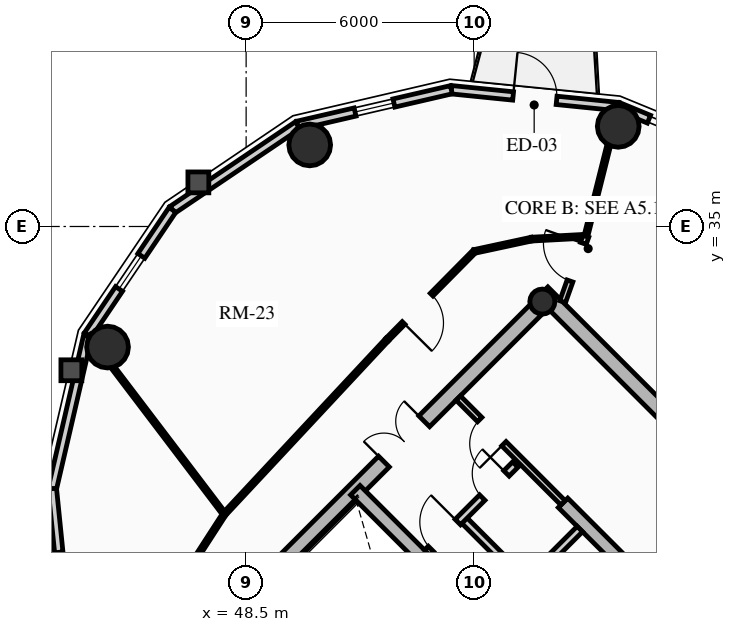
"""IFC4 building model, lengths in metres.
Left out: names, types, materials, properties, quantities, classifications, styles, units other than length and angle.
Written with IfcOpenShell. Run it as: python <this file> out.ifc"""

import sys

from ifc_helpers import new_model, si_unit, direction, frame, frame_2d, origin, origin_2d, place, context, subcontext, project, spatial, rectangle, circle, hollow_circle, extrude, source, transform, mapped, element, fill, save


model = new_model("IFC4")
c1 = context("Model", 3, precision=1e-05, world=origin(), true_north=direction((0.0, 1.0)))
c2 = subcontext(c1, "Body", "Model", "MODEL_VIEW")
j1 = project(units=[si_unit("LENGTHUNIT", "METRE"), si_unit("PLANEANGLEUNIT", "RADIAN")], contexts=[c1])
p1 = place(None, origin())
s1 = spatial("IfcSite", under=j1, at=p1, CompositionType="ELEMENT")
p2 = place(p1, origin())
s2 = spatial("IfcBuilding", under=s1, at=p2, CompositionType="ELEMENT")
p3 = place(p2, frame((0.0, 0.0, 199.57)))
s3 = spatial("IfcBuildingStorey", under=s2, at=p3, CompositionType="ELEMENT", Elevation=199.57)
p4 = place(p3, frame((66.268, 23.298, 0.0), z_axis=(0.0, 0.0, 1.0), x_axis=(-0.707106781187, 0.707106781187, 0.0)))
e1 = element("IfcWall", 1, at=p4, inside=s3, PredefinedType="SHEAR", context=c2, shape_type="SweptSolid", body=[
    extrude(rectangle(XDim=14.1, YDim=0.4, at=frame_2d((7.05, 0.0))), origin(), (0.0, 0.0, 1.0), 2.91),
])
p5 = place(p3, frame((48.873, 25.561, 0.0), z_axis=(0.0, 0.0, 1.0), x_axis=(0.707106781187, 0.707106781187, 0.0)))
e2 = element("IfcWall", 2, at=p5, inside=s3, PredefinedType="SHEAR", context=c2, shape_type="SweptSolid", body=[
    extrude(rectangle(XDim=10.7, YDim=0.4, at=frame_2d((5.35, 0.0))), origin(), (0.0, 0.0, 1.0), 2.91),
])
m1 = source(origin(), c2, "Body", "SweptSolid", [
    extrude(rectangle(XDim=1.5, YDim=2.02, at=frame_2d((0.75, 1.01))), frame((0.0, 0.21, 0.0), z_axis=(0.0, -1.0, 0.0), x_axis=(1.0, 0.0, 0.0)), (0.0, 0.0, 1.0), 0.42),
])
p6 = place(p5, frame((4.6, 0.0, 0.0)))
e3 = element("IfcOpeningElement", 3, at=p6, cuts=e2, PredefinedType="OPENING", context=c2, shape_type="MappedRepresentation", body=[
    mapped(m1, transform((0.0, 0.0, 0.0), x_axis=(1.0, 0.0, 0.0), y_axis=(0.0, 1.0, 0.0), z_axis=(0.0, 0.0, 1.0), scale=1.0)),
])
p7 = place(p3, frame((61.06, 18.373, 0.0), z_axis=(0.0, 0.0, 1.0), x_axis=(-0.707106781187, 0.707106781187, 0.0)))
e4 = element("IfcWall", 4, at=p7, inside=s3, PredefinedType="SHEAR", context=c2, shape_type="SweptSolid", body=[
    extrude(rectangle(XDim=13.7, YDim=0.35, at=frame_2d((6.85, 0.0))), origin(), (0.0, 0.0, 1.0), 2.91),
])
m2 = source(origin(), c2, "Body", "SweptSolid", [
    extrude(rectangle(XDim=1.1, YDim=2.015, at=frame_2d((0.55, 1.007))), frame((0.0, 0.185, 0.0), z_axis=(0.0, -1.0, 0.0), x_axis=(1.0, 0.0, 0.0)), (0.0, 0.0, 1.0), 0.37),
])
p8 = place(p7, frame((4.85, 0.0, 0.0)))
e5 = element("IfcOpeningElement", 5, at=p8, cuts=e4, PredefinedType="OPENING", context=c2, shape_type="MappedRepresentation", body=[
    mapped(m2, transform((0.0, 0.0, 0.0), x_axis=(1.0, 0.0, 0.0), y_axis=(0.0, 1.0, 0.0), z_axis=(0.0, 0.0, 1.0), scale=1.0)),
])
p9 = place(p7, frame((0.625, 0.0, 0.0)))
e6 = element("IfcOpeningElement", 6, at=p9, cuts=e4, PredefinedType="OPENING", context=c2, shape_type="MappedRepresentation", body=[
    mapped(m2, transform((0.0, 0.0, 0.0), x_axis=(1.0, 0.0, 0.0), y_axis=(0.0, 1.0, 0.0), z_axis=(0.0, 0.0, 1.0), scale=1.0)),
])
p10 = place(p7, frame((2.625, 0.0, 0.0)))
e7 = element("IfcOpeningElement", 7, at=p10, cuts=e4, PredefinedType="OPENING", context=c2, shape_type="MappedRepresentation", body=[
    mapped(m2, transform((0.0, 0.0, 0.0), x_axis=(1.0, 0.0, 0.0), y_axis=(0.0, 1.0, 0.0), z_axis=(0.0, 0.0, 1.0), scale=1.0)),
])
m3 = source(origin(), c2, "Body", "SweptSolid", [
    extrude(rectangle(XDim=1.15, YDim=2.02, at=frame_2d((0.575, 1.01))), frame((0.0, 0.185, 0.0), z_axis=(0.0, -1.0, 0.0), x_axis=(1.0, 0.0, 0.0)), (0.0, 0.0, 1.0), 0.37),
])
p11 = place(p7, frame((7.27, 0.0, 0.0)))
e8 = element("IfcOpeningElement", 8, at=p11, cuts=e4, PredefinedType="OPENING", context=c2, shape_type="MappedRepresentation", body=[
    mapped(m3, transform((0.0, 0.0, 0.0), x_axis=(1.0, 0.0, 0.0), y_axis=(0.0, 1.0, 0.0), z_axis=(0.0, 0.0, 1.0), scale=1.0)),
])
p12 = place(p3, frame((63.627, 20.94, 0.0), z_axis=(0.0, 0.0, 1.0), x_axis=(-0.707119496762, 0.707094065383, 0.0)))
e9 = element("IfcWall", 9, at=p12, inside=s3, PredefinedType="SHEAR", context=c2, shape_type="SweptSolid", body=[
    extrude(rectangle(XDim=9.6, YDim=0.35, at=frame_2d((4.8, 0.0))), origin(), (0.0, 0.0, 1.0), 2.91),
])
p13 = place(p12, frame((5.28, 0.0, 0.0)))
e10 = element("IfcOpeningElement", 10, at=p13, cuts=e9, PredefinedType="OPENING", context=c2, shape_type="MappedRepresentation", body=[
    mapped(m3, transform((0.0, 0.0, 0.0), x_axis=(1.0, 0.0, 0.0), y_axis=(0.0, 1.0, 0.0), z_axis=(0.0, 0.0, 1.0), scale=1.0)),
])
p14 = place(p3, frame((58.893, 25.674, 0.0), z_axis=(0.0, 0.0, 1.0), x_axis=(0.707106781187, 0.707106781187, 0.0)))
e11 = element("IfcWall", 11, at=p14, inside=s3, PredefinedType="SHEAR", context=c2, shape_type="SweptSolid", body=[
    extrude(rectangle(XDim=3.285, YDim=0.35, at=frame_2d((1.643, 0.0))), origin(), (0.0, 0.0, 1.0), 2.91),
])
p15 = place(p3, frame((56.294, 33.024, 0.0), z_axis=(0.0, 0.0, 1.0), x_axis=(0.707106781187, 0.707106781187, 0.0)))
e12 = element("IfcColumn", 12, at=p15, inside=s3, PredefinedType="COLUMN", context=c2, shape_type="SweptSolid", body=[
    extrude(hollow_circle(Radius=0.33, WallThickness=0.025, at=origin_2d()), origin(), (0.0, 0.0, 1.0), 2.91),
])
for number, where, z_axis, x_axis in (
    (13, (58.291, 37.635, 0.0), (0.0, 0.0, 1.0), (1.0, 0.0, 0.0)),
    (14, (50.173, 37.146, 0.0), (0.0, 0.0, 1.0), (1.0, 0.0, 0.0)),
    (15, (44.854, 31.827, 0.0), (0.0, 0.0, 1.0), (1.0, 0.0, 0.0)),
):
    element("IfcColumn", number, at=place(p3, frame(where, z_axis=z_axis, x_axis=x_axis)), inside=s3, PredefinedType="USERDEFINED", context=c2, shape_type="SweptSolid", body=[
        extrude(circle(Radius=0.55, at=origin_2d()), origin(), (0.0, 0.0, 1.0), 2.91),
    ])
p16 = place(p3, frame((58.295, 38.155, 0.0), z_axis=(0.0, 0.0, 1.0), x_axis=(0.924515260676, -0.381145028536, 0.0)))
e16 = element("IfcWall", 16, at=p16, inside=s3, PredefinedType="SOLIDWALL", context=c2, shape_type="SweptSolid", body=[
    extrude(rectangle(XDim=0.87, YDim=0.22, at=frame_2d((0.435, 0.0))), origin(), (0.0, 0.0, 1.0), 2.322),
])
p17 = place(p3, frame((53.9, 38.599, 0.0), z_axis=(0.0, 0.0, 1.0), x_axis=(0.994929930991, -0.100570534541, 0.0)))
e17 = element("IfcWall", 17, at=p17, inside=s3, PredefinedType="SOLIDWALL", context=c2, shape_type="SweptSolid", body=[
    extrude(rectangle(XDim=4.418, YDim=0.22, at=frame_2d((2.209, 0.0))), origin(), (0.0, 0.0, 1.0), 2.322),
])
m4 = source(origin(), c2, "Body", "SweptSolid", [
    extrude(rectangle(XDim=1.15, YDim=2.005, at=frame_2d((0.575, 1.002))), frame((0.0, 0.12, 0.0), z_axis=(0.0, -1.0, 0.0), x_axis=(1.0, 0.0, 0.0)), (0.0, 0.0, 1.0), 0.24),
])
p18 = place(p17, frame((1.634, 0.0, 0.0)))
e18 = element("IfcOpeningElement", 18, at=p18, cuts=e17, PredefinedType="OPENING", context=c2, shape_type="MappedRepresentation", body=[
    mapped(m4, transform((0.0, 0.0, 0.0), x_axis=(1.0, 0.0, 0.0), y_axis=(0.0, 1.0, 0.0), z_axis=(0.0, 0.0, 1.0), scale=1.0)),
])
p19 = place(p3, frame((49.856, 37.663, 0.0), z_axis=(0.0, 0.0, 1.0), x_axis=(0.974249228678, 0.225473813158, 0.0)))
e19 = element("IfcWall", 19, at=p19, inside=s3, PredefinedType="SOLIDWALL", context=c2, shape_type="SweptSolid", body=[
    extrude(rectangle(XDim=4.15, YDim=0.22, at=frame_2d((2.075, 0.0))), origin(), (0.0, 0.0, 1.0), 2.322),
])
m5 = source(origin(), c2, "Body", "SweptSolid", [
    extrude(rectangle(XDim=1.05, YDim=1.3, at=frame_2d((0.525, 0.65))), frame((0.0, 0.12, 0.0), z_axis=(0.0, -1.0, 0.0), x_axis=(1.0, 0.0, 0.0)), (0.0, 0.0, 1.0), 0.24),
])
p20 = place(p19, frame((1.55, 0.0, 0.65)))
e20 = element("IfcOpeningElement", 20, at=p20, cuts=e19, PredefinedType="OPENING", context=c2, shape_type="MappedRepresentation", body=[
    mapped(m5, transform((0.0, 0.0, 0.0), x_axis=(1.0, 0.0, 0.0), y_axis=(0.0, 1.0, 0.0), z_axis=(0.0, 0.0, 1.0), scale=1.0)),
])
p21 = place(p3, frame((46.561, 35.439, 0.0), z_axis=(0.0, 0.0, 1.0), x_axis=(0.828833723692, 0.559495003079, 0.0)))
e21 = element("IfcWall", 21, at=p21, inside=s3, PredefinedType="SOLIDWALL", context=c2, shape_type="SweptSolid", body=[
    extrude(rectangle(XDim=3.976, YDim=0.22, at=frame_2d((1.988, 0.0))), origin(), (0.0, 0.0, 1.0), 2.322),
])
p22 = place(p3, frame((44.337, 32.144, 0.0), z_axis=(0.0, 0.0, 1.0), x_axis=(0.559495003079, 0.828833723692, 0.0)))
e22 = element("IfcWall", 22, at=p22, inside=s3, PredefinedType="SOLIDWALL", context=c2, shape_type="SweptSolid", body=[
    extrude(rectangle(XDim=3.976, YDim=0.22, at=frame_2d((1.988, 0.0))), origin(), (0.0, 0.0, 1.0), 2.322),
])
p23 = place(p22, frame((1.463, 0.0, 0.65)))
e23 = element("IfcOpeningElement", 23, at=p23, cuts=e22, PredefinedType="OPENING", context=c2, shape_type="MappedRepresentation", body=[
    mapped(m5, transform((0.0, 0.0, 0.0), x_axis=(1.0, 0.0, 0.0), y_axis=(0.0, 1.0, 0.0), z_axis=(0.0, 0.0, 1.0), scale=1.0)),
])
p24 = place(p3, frame((43.401, 28.1, 0.0), z_axis=(0.0, 0.0, 1.0), x_axis=(0.225473813158, 0.974249228678, 0.0)))
e24 = element("IfcWall", 24, at=p24, inside=s3, PredefinedType="SOLIDWALL", context=c2, shape_type="SweptSolid", body=[
    extrude(rectangle(XDim=4.15, YDim=0.22, at=frame_2d((2.075, 0.0))), origin(), (0.0, 0.0, 1.0), 2.322),
])
p25 = place(p3, frame((43.845, 23.705, 0.0), z_axis=(0.0, 0.0, 1.0), x_axis=(-0.100570534541, 0.994929930991, 0.0)))
e25 = element("IfcWall", 25, at=p25, inside=s3, PredefinedType="SOLIDWALL", context=c2, shape_type="SweptSolid", body=[
    extrude(rectangle(XDim=4.418, YDim=0.22, at=frame_2d((2.209, 0.0))), origin(), (0.0, 0.0, 1.0), 2.322),
])
p26 = place(p25, frame((1.684, 0.0, 0.65)))
e26 = element("IfcOpeningElement", 26, at=p26, cuts=e25, PredefinedType="OPENING", context=c2, shape_type="MappedRepresentation", body=[
    mapped(m5, transform((0.0, 0.0, 0.0), x_axis=(1.0, 0.0, 0.0), y_axis=(0.0, 1.0, 0.0), z_axis=(0.0, 0.0, 1.0), scale=1.0)),
])
p27 = place(p3, frame((54.961, 24.719, 0.0), z_axis=(0.0, 0.0, 1.0), x_axis=(0.707106781187, 0.707106781187, 0.0)))
e27 = element("IfcWall", 27, at=p27, inside=s3, PredefinedType="PARTITIONING", context=c2, shape_type="SweptSolid", body=[
    extrude(rectangle(XDim=3.28, YDim=0.2, at=frame_2d((1.64, 0.0))), origin(), (0.0, 0.0, 1.0), 2.685),
])
m6 = source(origin(), c2, "Body", "SweptSolid", [
    extrude(rectangle(XDim=0.9, YDim=2.005, at=frame_2d((0.45, 1.002))), frame((0.0, 0.11, 0.0), z_axis=(0.0, -1.0, 0.0), x_axis=(1.0, 0.0, 0.0)), (0.0, 0.0, 1.0), 0.22),
])
p28 = place(p27, frame((0.16, 0.0, 0.0)))
e28 = element("IfcOpeningElement", 28, at=p28, cuts=e27, PredefinedType="OPENING", context=c2, shape_type="MappedRepresentation", body=[
    mapped(m6, transform((0.0, 0.0, 0.0), x_axis=(1.0, 0.0, 0.0), y_axis=(0.0, 1.0, 0.0), z_axis=(0.0, 0.0, 1.0), scale=1.0)),
])
p29 = place(p3, frame((55.874, 25.631, 0.0), z_axis=(0.0, 0.0, 1.0), x_axis=(-0.707157639372, 0.707055919343, 0.0)))
e29 = element("IfcWall", 29, at=p29, inside=s3, PredefinedType="PARTITIONING", context=c2, shape_type="SweptSolid", body=[
    extrude(rectangle(XDim=2.4, YDim=0.2, at=frame_2d((1.2, 0.0))), origin(), (0.0, 0.0, 1.0), 2.685),
])
p30 = place(p3, frame((53.264, 26.416, 0.0), z_axis=(0.0, 0.0, 1.0), x_axis=(0.707106781187, 0.707106781187, 0.0)))
e30 = element("IfcWall", 30, at=p30, inside=s3, PredefinedType="PARTITIONING", context=c2, shape_type="SweptSolid", body=[
    extrude(rectangle(XDim=3.28, YDim=0.2, at=frame_2d((1.64, 0.0))), origin(), (0.0, 0.0, 1.0), 2.685),
])
m7 = source(origin(), c2, "Body", "SweptSolid", [
    extrude(rectangle(XDim=1.0, YDim=2.015, at=frame_2d((0.5, 1.007))), frame((0.0, 0.11, 0.0), z_axis=(0.0, -1.0, 0.0), x_axis=(1.0, 0.0, 0.0)), (0.0, 0.0, 1.0), 0.22),
])
p31 = place(p30, frame((0.14, 0.0, 0.0)))
e31 = element("IfcOpeningElement", 31, at=p31, cuts=e30, PredefinedType="OPENING", context=c2, shape_type="MappedRepresentation", body=[
    mapped(m7, transform((0.0, 0.0, 0.0), x_axis=(1.0, 0.0, 0.0), y_axis=(0.0, 1.0, 0.0), z_axis=(0.0, 0.0, 1.0), scale=1.0)),
])
p32 = place(p30, frame((2.05, 0.0, 0.0)))
e32 = element("IfcOpeningElement", 32, at=p32, cuts=e30, PredefinedType="OPENING", context=c2, shape_type="MappedRepresentation", body=[
    mapped(m6, transform((0.0, 0.0, 0.0), x_axis=(1.0, 0.0, 0.0), y_axis=(0.0, 1.0, 0.0), z_axis=(0.0, 0.0, 1.0), scale=1.0)),
])
p33 = place(p3, frame((56.839, 27.728, 0.0), z_axis=(0.0, 0.0, 1.0), x_axis=(-0.707106781187, 0.707106781187, 0.0)))
e33 = element("IfcWall", 33, at=p33, inside=s3, PredefinedType="PARTITIONING", context=c2, shape_type="SweptSolid", body=[
    extrude(rectangle(XDim=3.9, YDim=0.16, at=frame_2d((1.95, 0.0))), origin(), (0.0, 0.0, 1.0), 2.685),
])
m8 = source(origin(), c2, "Body", "SweptSolid", [
    extrude(rectangle(XDim=0.9, YDim=2.005, at=frame_2d((0.45, 1.002))), frame((0.0, 0.09, 0.0), z_axis=(0.0, -1.0, 0.0), x_axis=(1.0, 0.0, 0.0)), (0.0, 0.0, 1.0), 0.18),
])
p34 = place(p33, frame((2.2, 0.0, 0.0)))
e34 = element("IfcOpeningElement", 34, at=p34, cuts=e33, PredefinedType="OPENING", context=c2, shape_type="MappedRepresentation", body=[
    mapped(m8, transform((0.0, 0.0, 0.0), x_axis=(1.0, 0.0, 0.0), y_axis=(0.0, 1.0, 0.0), z_axis=(0.0, 0.0, 1.0), scale=1.0)),
])
p35 = place(p3, frame((57.44, 34.744, 0.0), z_axis=(0.0, 0.0, 1.0), x_axis=(-0.998578025565, -0.053309725738, 0.0)))
e35 = element("IfcWall", 35, at=p35, inside=s3, PredefinedType="MOVABLE", context=c2, shape_type="SweptSolid", body=[
    extrude(rectangle(XDim=1.433, YDim=0.1, at=frame_2d((0.717, 0.0))), origin(), (0.0, 0.0, 1.0), 2.322),
])
p36 = place(p3, frame((56.009, 34.667, 0.0), z_axis=(0.0, 0.0, 1.0), x_axis=(-0.977625498152, -0.210353001795, 0.0)))
e36 = element("IfcWall", 36, at=p36, inside=s3, PredefinedType="MOVABLE", context=c2, shape_type="SweptSolid", body=[
    extrude(rectangle(XDim=1.538, YDim=0.1, at=frame_2d((0.769, 0.0))), origin(), (0.0, 0.0, 1.0), 2.255),
])
p37 = place(p3, frame((54.506, 34.344, 0.0), z_axis=(0.0, 0.0, 1.0), x_axis=(-0.703053402247, -0.711137056824, 0.0)))
e37 = element("IfcWall", 37, at=p37, inside=s3, PredefinedType="MOVABLE", context=c2, shape_type="SweptSolid", body=[
    extrude(rectangle(XDim=3.262, YDim=0.1, at=frame_2d((1.631, 0.0))), origin(), (0.0, 0.0, 1.0), 2.322),
])
m9 = source(origin(), c2, "Body", "SweptSolid", [
    extrude(rectangle(XDim=1.05, YDim=2.015, at=frame_2d((0.525, 1.007))), frame((0.0, 0.06, 0.0), z_axis=(0.0, -1.0, 0.0), x_axis=(1.0, 0.0, 0.0)), (0.0, 0.0, 1.0), 0.12),
])
p38 = place(p37, frame((1.599, 0.0, 0.0)))
e38 = element("IfcOpeningElement", 38, at=p38, cuts=e37, PredefinedType="OPENING", context=c2, shape_type="MappedRepresentation", body=[
    mapped(m9, transform((0.0, 0.0, 0.0), x_axis=(1.0, 0.0, 0.0), y_axis=(0.0, 1.0, 0.0), z_axis=(0.0, 0.0, 1.0), scale=1.0)),
])
p39 = place(p3, frame((52.212, 32.024, 0.0), z_axis=(0.0, 0.0, 1.0), x_axis=(-0.682158998173, -0.731203871169, 0.0)))
e39 = element("IfcWall", 39, at=p39, inside=s3, PredefinedType="MOVABLE", context=c2, shape_type="SweptSolid", body=[
    extrude(rectangle(XDim=6.282, YDim=0.1, at=frame_2d((3.141, 0.0))), origin(), (0.0, 0.0, 1.0), 2.255),
])
p40 = place(p3, frame((47.927, 27.431, 0.0), z_axis=(0.0, 0.0, 1.0), x_axis=(-0.543126643356, -0.839650790077, 0.0)))
e40 = element("IfcWall", 40, at=p40, inside=s3, PredefinedType="MOVABLE", context=c2, shape_type="SweptSolid", body=[
    extrude(rectangle(XDim=1.868, YDim=0.1, at=frame_2d((0.934, 0.0))), origin(), (0.0, 0.0, 1.0), 2.255),
])
p41 = place(p3, frame((57.44, 34.744, 0.0), z_axis=(0.0, 0.0, 1.0), x_axis=(0.243619816457, 0.969870808422, 0.0)))
e41 = element("IfcWall", 41, at=p41, inside=s3, PredefinedType="MOVABLE", context=c2, shape_type="SweptSolid", body=[
    extrude(rectangle(XDim=3.496, YDim=0.1, at=frame_2d((1.748, 0.0))), origin(), (0.0, 0.0, 1.0), 2.322),
])
p42 = place(p3, frame((47.927, 27.431, 0.0), z_axis=(0.0, 0.0, 1.0), x_axis=(-0.604823333103, 0.796359677366, 0.0)))
e42 = element("IfcWall", 42, at=p42, inside=s3, PredefinedType="MOVABLE", context=c2, shape_type="SweptSolid", body=[
    extrude(rectangle(XDim=5.907, YDim=0.1, at=frame_2d((2.953, 0.0))), origin(), (0.0, 0.0, 1.0), 2.322),
])
p43 = place(p3, frame((56.828, 33.021, 0.0), z_axis=(0.0, 0.0, 1.0), x_axis=(0.334788446034, 0.942293317605, 0.0)))
e43 = element("IfcWall", 43, at=p43, inside=s3, PredefinedType="PARTITIONING", context=c2, shape_type="SweptSolid", body=[
    extrude(rectangle(XDim=1.829, YDim=0.16, at=frame_2d((0.915, 0.0))), origin(), (0.0, 0.0, 1.0), 2.255),
])
m10 = source(origin(), c2, "Body", "SweptSolid", [
    extrude(rectangle(XDim=1.05, YDim=2.015, at=frame_2d((0.525, 1.007))), frame((0.0, 0.09, 0.0), z_axis=(0.0, -1.0, 0.0), x_axis=(1.0, 0.0, 0.0)), (0.0, 0.0, 1.0), 0.18),
])
p44 = place(p43, frame((0.579, 0.0, 0.0)))
e44 = element("IfcOpeningElement", 44, at=p44, cuts=e43, PredefinedType="OPENING", context=c2, shape_type="MappedRepresentation", body=[
    mapped(m10, transform((0.0, 0.0, 0.0), x_axis=(1.0, 0.0, 0.0), y_axis=(0.0, 1.0, 0.0), z_axis=(0.0, 0.0, 1.0), scale=1.0)),
])
m11 = source(origin(), c2, "Body", "SweptSolid", [
    extrude(rectangle(XDim=1.15, YDim=2.005, at=frame_2d((0.575, 1.002))), frame((0.0, 0.025, 0.0), z_axis=(0.0, -1.0, 0.0), x_axis=(1.0, 0.0, 0.0)), (0.0, 0.0, 1.0), 0.05),
])
p45 = place(p18, origin())
e45 = element("IfcDoor", 45, at=p45, inside=s3, OperationType="SINGLE_SWING_LEFT", PredefinedType="DOOR", context=c2, shape_type="MappedRepresentation", body=[
    mapped(m11, transform((0.0, 0.0, 0.0), x_axis=(1.0, 0.0, 0.0), y_axis=(0.0, 1.0, 0.0), z_axis=(0.0, 0.0, 1.0), scale=1.0)),
])
fill(e18, e45)
m12 = source(origin(), c2, "Body", "SweptSolid", [
    extrude(rectangle(XDim=1.05, YDim=1.3, at=frame_2d((0.525, 0.65))), frame((0.0, 0.03, 0.0), z_axis=(0.0, -1.0, 0.0), x_axis=(1.0, 0.0, 0.0)), (0.0, 0.0, 1.0), 0.06),
])
p46 = place(p20, origin())
e46 = element("IfcWindow", 46, at=p46, inside=s3, PartitioningType="SINGLE_PANEL", PredefinedType="WINDOW", context=c2, shape_type="MappedRepresentation", body=[
    mapped(m12, transform((0.0, 0.0, 0.0), x_axis=(1.0, 0.0, 0.0), y_axis=(0.0, 1.0, 0.0), z_axis=(0.0, 0.0, 1.0), scale=1.0)),
])
fill(e20, e46)
p47 = place(p23, origin())
e47 = element("IfcWindow", 47, at=p47, inside=s3, PartitioningType="SINGLE_PANEL", PredefinedType="WINDOW", context=c2, shape_type="MappedRepresentation", body=[
    mapped(m12, transform((0.0, 0.0, 0.0), x_axis=(1.0, 0.0, 0.0), y_axis=(0.0, 1.0, 0.0), z_axis=(0.0, 0.0, 1.0), scale=1.0)),
])
fill(e23, e47)
m13 = source(origin(), c2, "Body", "SweptSolid", [
    extrude(rectangle(XDim=1.5, YDim=2.02, at=frame_2d((0.75, 1.01))), frame((0.0, 0.025, 0.0), z_axis=(0.0, -1.0, 0.0), x_axis=(1.0, 0.0, 0.0)), (0.0, 0.0, 1.0), 0.05),
])
p48 = place(p6, origin())
e48 = element("IfcDoor", 48, at=p48, inside=s3, OperationType="DOUBLE_DOOR_SINGLE_SWING", PredefinedType="DOOR", context=c2, shape_type="MappedRepresentation", body=[
    mapped(m13, transform((0.0, 0.0, 0.0), x_axis=(1.0, 0.0, 0.0), y_axis=(0.0, 1.0, 0.0), z_axis=(0.0, 0.0, 1.0), scale=1.0)),
])
fill(e3, e48)
m14 = source(origin(), c2, "Body", "SweptSolid", [
    extrude(rectangle(XDim=1.0, YDim=2.015, at=frame_2d((0.5, 1.007))), frame((0.0, 0.025, 0.0), z_axis=(0.0, -1.0, 0.0), x_axis=(1.0, 0.0, 0.0)), (0.0, 0.0, 1.0), 0.05),
])
p49 = place(p31, origin())
e49 = element("IfcDoor", 49, at=p49, inside=s3, OperationType="SINGLE_SWING_RIGHT", PredefinedType="DOOR", context=c2, shape_type="MappedRepresentation", body=[
    mapped(m14, transform((0.0, 0.0, 0.0), x_axis=(1.0, 0.0, 0.0), y_axis=(0.0, 1.0, 0.0), z_axis=(0.0, 0.0, 1.0), scale=1.0)),
])
fill(e31, e49)
m15 = source(origin(), c2, "Body", "SweptSolid", [
    extrude(rectangle(XDim=0.9, YDim=2.005, at=frame_2d((0.45, 1.002))), frame((0.0, 0.025, 0.0), z_axis=(0.0, -1.0, 0.0), x_axis=(1.0, 0.0, 0.0)), (0.0, 0.0, 1.0), 0.05),
])
p50 = place(p32, origin())
e50 = element("IfcDoor", 50, at=p50, inside=s3, OperationType="SINGLE_SWING_RIGHT", PredefinedType="DOOR", context=c2, shape_type="MappedRepresentation", body=[
    mapped(m15, transform((0.0, 0.0, 0.0), x_axis=(1.0, 0.0, 0.0), y_axis=(0.0, 1.0, 0.0), z_axis=(0.0, 0.0, 1.0), scale=1.0)),
])
fill(e32, e50)
p51 = place(p34, origin())
e51 = element("IfcDoor", 51, at=p51, inside=s3, OperationType="SINGLE_SWING_LEFT", PredefinedType="DOOR", context=c2, shape_type="MappedRepresentation", body=[
    mapped(m15, transform((0.0, 0.0, 0.0), x_axis=(1.0, 0.0, 0.0), y_axis=(0.0, 1.0, 0.0), z_axis=(0.0, 0.0, 1.0), scale=1.0)),
])
fill(e34, e51)
m16 = source(origin(), c2, "Body", "SweptSolid", [
    extrude(rectangle(XDim=1.05, YDim=2.015, at=frame_2d((0.525, 1.007))), frame((0.0, 0.025, 0.0), z_axis=(0.0, -1.0, 0.0), x_axis=(1.0, 0.0, 0.0)), (0.0, 0.0, 1.0), 0.05),
])
p52 = place(p44, origin())
e52 = element("IfcDoor", 52, at=p52, inside=s3, OperationType="SINGLE_SWING_RIGHT", PredefinedType="DOOR", context=c2, shape_type="MappedRepresentation", body=[
    mapped(m16, transform((0.0, 0.0, 0.0), x_axis=(1.0, 0.0, 0.0), y_axis=(0.0, 1.0, 0.0), z_axis=(0.0, 0.0, 1.0), scale=1.0)),
])
fill(e44, e52)
p53 = place(p38, origin())
e53 = element("IfcDoor", 53, at=p53, inside=s3, OperationType="SINGLE_SWING_RIGHT", PredefinedType="DOOR", context=c2, shape_type="MappedRepresentation", body=[
    mapped(m16, transform((0.0, 0.0, 0.0), x_axis=(1.0, 0.0, 0.0), y_axis=(0.0, 1.0, 0.0), z_axis=(0.0, 0.0, 1.0), scale=1.0)),
])
fill(e38, e53)
save(model, sys.argv[1])
